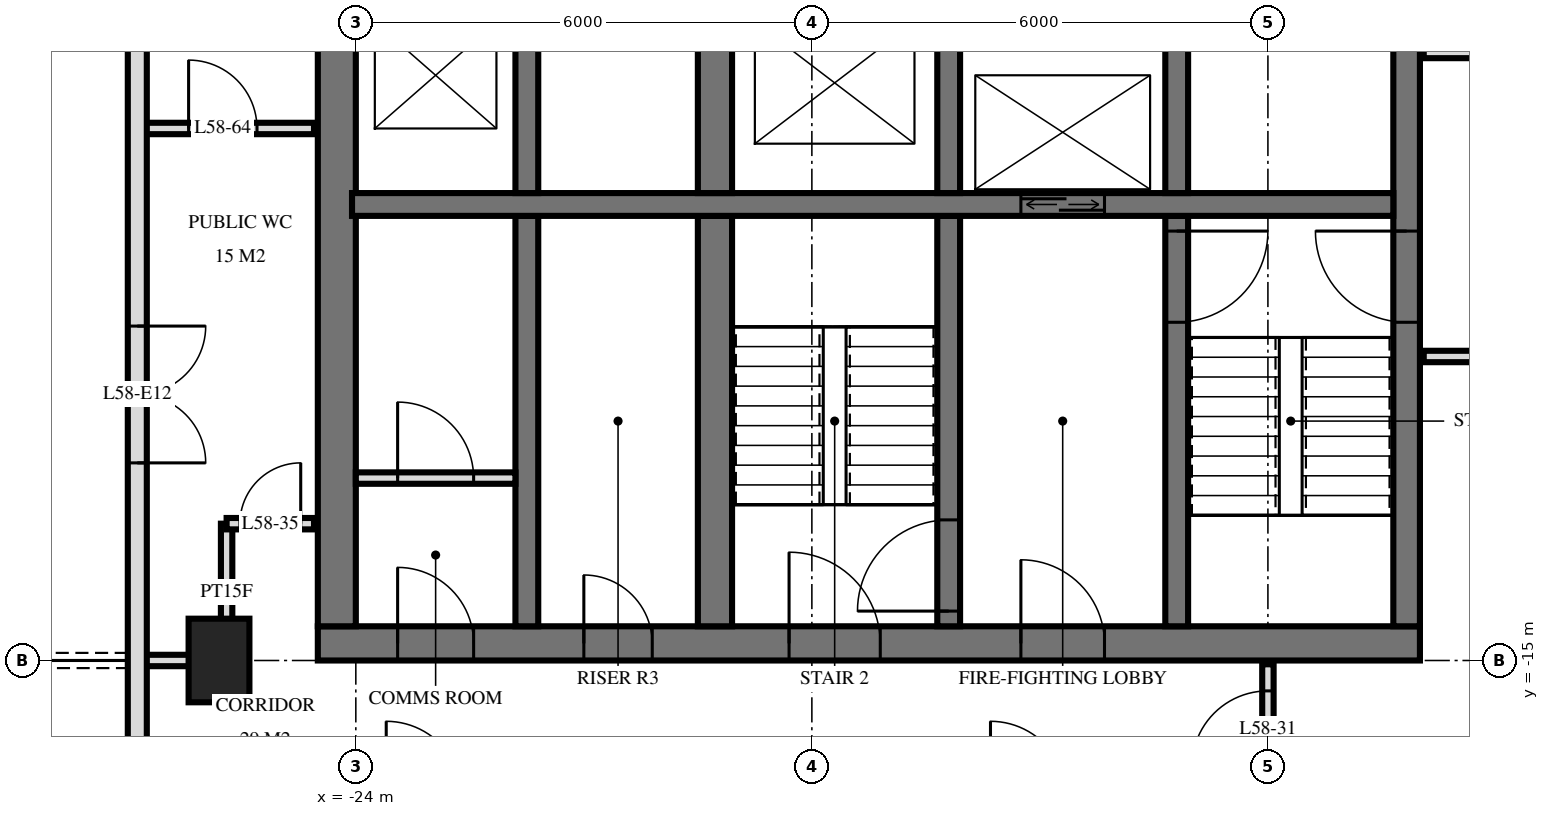
"""IFC4 building model, lengths in metres.
Left out: names, types, materials, properties, quantities, classifications, styles, units other than length and angle.
Written with IfcOpenShell. Run it as: python <this file> out.ifc"""

import sys

from ifc_helpers import new_model, si_unit, direction, frame, frame_2d, origin, origin_2d, place, context, subcontext, project, spatial, rectangle, extrude, element, fill, save


model = new_model("IFC4")
c1 = context("Model", 3, precision=1e-05, world=origin(), true_north=direction((0.0, 1.0)))
c2 = subcontext(c1, "Body", "Model", "MODEL_VIEW")
j1 = project(units=[si_unit("LENGTHUNIT", "METRE"), si_unit("PLANEANGLEUNIT", "RADIAN")], contexts=[c1])
p1 = place(None, origin())
s1 = spatial("IfcSite", under=j1, at=p1, CompositionType="ELEMENT")
p2 = place(p1, origin())
s2 = spatial("IfcBuilding", under=s1, at=p2, CompositionType="ELEMENT")
p3 = place(p2, frame((0.0, 0.0, 222.1)))
s3 = spatial("IfcBuildingStorey", under=s2, at=p3, CompositionType="ELEMENT", Elevation=222.1)
p4 = place(p3, frame((-25.8, -15.0, 0.0), z_axis=(0.0, 0.0, 1.0), x_axis=(0.0, 1.0, 0.0)))
e1 = element("IfcColumn", 1, at=p4, inside=s3, PredefinedType="COLUMN", context=c2, shape_type="SweptSolid", body=[
    extrude(rectangle(XDim=1.1, YDim=0.8, at=origin_2d()), origin(), (0.0, 0.0, 1.0), 3.5),
])
p5 = place(p3, frame((-24.5, -14.775, 0.0), z_axis=(0.0, 0.0, 1.0), x_axis=(1.0, 0.0, 0.0)))
e2 = element("IfcWall", 2, at=p5, inside=s3, PredefinedType="SHEAR", context=c2, shape_type="SweptSolid", body=[
    extrude(rectangle(XDim=14.5, YDim=0.45, at=frame_2d((7.25, 0.0))), origin(), (0.0, 0.0, 1.0), 3.5),
])
p6 = place(p5, frame((6.2, 0.0, 0.0)))
e3 = element("IfcOpeningElement", 3, at=p6, cuts=e2, PredefinedType="OPENING", context=c2, shape_type="SweptSolid", body=[
    extrude(rectangle(XDim=1.2, YDim=2.1, at=frame_2d((0.6, 1.05))), frame((0.0, 0.235, 0.0), z_axis=(0.0, -1.0, 0.0), x_axis=(1.0, 0.0, 0.0)), (0.0, 0.0, 1.0), 0.47),
])
p7 = place(p5, frame((9.25, 0.0, 0.0)))
e4 = element("IfcOpeningElement", 4, at=p7, cuts=e2, PredefinedType="OPENING", context=c2, shape_type="SweptSolid", body=[
    extrude(rectangle(XDim=1.1, YDim=2.1, at=frame_2d((0.55, 1.05))), frame((0.0, 0.235, 0.0), z_axis=(0.0, -1.0, 0.0), x_axis=(1.0, 0.0, 0.0)), (0.0, 0.0, 1.0), 0.47),
])
p8 = place(p5, frame((3.5, 0.0, 0.0)))
e5 = element("IfcOpeningElement", 5, at=p8, cuts=e2, PredefinedType="OPENING", context=c2, shape_type="SweptSolid", body=[
    extrude(rectangle(XDim=0.9, YDim=2.1, at=frame_2d((0.45, 1.05))), frame((0.0, 0.235, 0.0), z_axis=(0.0, -1.0, 0.0), x_axis=(1.0, 0.0, 0.0)), (0.0, 0.0, 1.0), 0.47),
])
p9 = place(p5, frame((1.05, 0.0, 0.0)))
e6 = element("IfcOpeningElement", 6, at=p9, cuts=e2, PredefinedType="OPENING", context=c2, shape_type="SweptSolid", body=[
    extrude(rectangle(XDim=1.0, YDim=2.1, at=frame_2d((0.5, 1.05))), frame((0.0, 0.235, 0.0), z_axis=(0.0, -1.0, 0.0), x_axis=(1.0, 0.0, 0.0)), (0.0, 0.0, 1.0), 0.47),
])
p10 = place(p3, frame((-10.175, -14.55, 0.0), z_axis=(0.0, 0.0, 1.0), x_axis=(0.0, 1.0, 0.0)))
e7 = element("IfcWall", 7, at=p10, inside=s3, PredefinedType="SHEAR", context=c2, shape_type="SweptSolid", body=[
    extrude(rectangle(XDim=14.1, YDim=0.35, at=frame_2d((7.05, 0.0))), origin(), (0.0, 0.0, 1.0), 3.5),
])
p11 = place(p10, frame((8.4, 0.0, 0.0)))
e8 = element("IfcOpeningElement", 8, at=p11, cuts=e7, PredefinedType="OPENING", context=c2, shape_type="SweptSolid", body=[
    extrude(rectangle(XDim=1.4, YDim=2.4, at=frame_2d((0.7, 1.2))), frame((0.0, 0.185, 0.0), z_axis=(0.0, -1.0, 0.0), x_axis=(1.0, 0.0, 0.0)), (0.0, 0.0, 1.0), 0.37),
])
p12 = place(p10, frame((10.0, 0.0, 0.0)))
e9 = element("IfcOpeningElement", 9, at=p12, cuts=e7, PredefinedType="OPENING", context=c2, shape_type="SweptSolid", body=[
    extrude(rectangle(XDim=1.4, YDim=2.4, at=frame_2d((0.7, 1.2))), frame((0.0, 0.185, 0.0), z_axis=(0.0, -1.0, 0.0), x_axis=(1.0, 0.0, 0.0)), (0.0, 0.0, 1.0), 0.37),
])
p13 = place(p10, frame((4.0, 0.0, 0.0)))
e10 = element("IfcOpeningElement", 10, at=p13, cuts=e7, PredefinedType="OPENING", context=c2, shape_type="SweptSolid", body=[
    extrude(rectangle(XDim=1.2, YDim=2.1, at=frame_2d((0.6, 1.05))), frame((0.0, 0.185, 0.0), z_axis=(0.0, -1.0, 0.0), x_axis=(1.0, 0.0, 0.0)), (0.0, 0.0, 1.0), 0.37),
])
p14 = place(p3, frame((-24.25, -14.55, 0.0), z_axis=(0.0, 0.0, 1.0), x_axis=(0.0, 1.0, 0.0)))
e11 = element("IfcWall", 11, at=p14, inside=s3, PredefinedType="SHEAR", context=c2, shape_type="SweptSolid", body=[
    extrude(rectangle(XDim=14.1, YDim=0.5, at=frame_2d((7.05, 0.0))), origin(), (0.0, 0.0, 1.0), 3.5),
])
p15 = place(p3, frame((-24.05, -9.0, 0.0), z_axis=(0.0, 0.0, 1.0), x_axis=(1.0, 0.0, 0.0)))
e12 = element("IfcWall", 12, at=p15, inside=s3, PredefinedType="SHEAR", context=c2, shape_type="SweptSolid", body=[
    extrude(rectangle(XDim=13.7, YDim=0.3, at=frame_2d((6.85, 0.0))), origin(), (0.0, 0.0, 1.0), 3.5),
])
p16 = place(p15, frame((8.8, 0.0, 0.0)))
e13 = element("IfcOpeningElement", 13, at=p16, cuts=e12, PredefinedType="OPENING", context=c2, shape_type="SweptSolid", body=[
    extrude(rectangle(XDim=1.1, YDim=2.1, at=frame_2d((0.55, 1.05))), frame((0.0, 0.16, 0.0), z_axis=(0.0, -1.0, 0.0), x_axis=(1.0, 0.0, 0.0)), (0.0, 0.0, 1.0), 0.32),
])
p17 = place(p3, frame((-13.2, -8.85, 0.0), z_axis=(0.0, 0.0, 1.0), x_axis=(0.0, 1.0, 0.0)))
e14 = element("IfcWall", 14, at=p17, inside=s3, PredefinedType="SHEAR", context=c2, shape_type="SweptSolid", body=[
    extrude(rectangle(XDim=2.3, YDim=0.3, at=frame_2d((1.15, 0.0))), origin(), (0.0, 0.0, 1.0), 3.5),
])
p18 = place(p3, frame((-13.2, -14.55, 0.0), z_axis=(0.0, 0.0, 1.0), x_axis=(0.0, 1.0, 0.0)))
e15 = element("IfcWall", 15, at=p18, inside=s3, PredefinedType="SHEAR", context=c2, shape_type="SweptSolid", body=[
    extrude(rectangle(XDim=5.4, YDim=0.3, at=frame_2d((2.7, 0.0))), origin(), (0.0, 0.0, 1.0), 3.5),
])
p19 = place(p18, frame((4.0, 0.0, 0.0)))
e16 = element("IfcOpeningElement", 16, at=p19, cuts=e15, PredefinedType="OPENING", context=c2, shape_type="SweptSolid", body=[
    extrude(rectangle(XDim=1.2, YDim=2.1, at=frame_2d((0.6, 1.05))), frame((0.0, 0.16, 0.0), z_axis=(0.0, -1.0, 0.0), x_axis=(1.0, 0.0, 0.0)), (0.0, 0.0, 1.0), 0.32),
])
p20 = place(p3, frame((-16.2, -8.85, 0.0), z_axis=(0.0, 0.0, 1.0), x_axis=(0.0, 1.0, 0.0)))
e17 = element("IfcWall", 17, at=p20, inside=s3, PredefinedType="SHEAR", context=c2, shape_type="SweptSolid", body=[
    extrude(rectangle(XDim=2.3, YDim=0.3, at=frame_2d((1.15, 0.0))), origin(), (0.0, 0.0, 1.0), 3.5),
])
p21 = place(p3, frame((-16.2, -14.55, 0.0), z_axis=(0.0, 0.0, 1.0), x_axis=(0.0, 1.0, 0.0)))
e18 = element("IfcWall", 18, at=p21, inside=s3, PredefinedType="SHEAR", context=c2, shape_type="SweptSolid", body=[
    extrude(rectangle(XDim=5.4, YDim=0.3, at=frame_2d((2.7, 0.0))), origin(), (0.0, 0.0, 1.0), 3.5),
])
p22 = place(p21, frame((0.2, 0.0, 0.0)))
e19 = element("IfcOpeningElement", 19, at=p22, cuts=e18, PredefinedType="OPENING", context=c2, shape_type="SweptSolid", body=[
    extrude(rectangle(XDim=1.2, YDim=2.1, at=frame_2d((0.6, 1.05))), frame((0.0, 0.16, 0.0), z_axis=(0.0, -1.0, 0.0), x_axis=(1.0, 0.0, 0.0)), (0.0, 0.0, 1.0), 0.32),
])
p23 = place(p3, frame((-19.275, -8.85, 0.0), z_axis=(0.0, 0.0, 1.0), x_axis=(0.0, 1.0, 0.0)))
e20 = element("IfcWall", 20, at=p23, inside=s3, PredefinedType="SHEAR", context=c2, shape_type="SweptSolid", body=[
    extrude(rectangle(XDim=2.3, YDim=0.45, at=frame_2d((1.15, 0.0))), origin(), (0.0, 0.0, 1.0), 3.5),
])
p24 = place(p3, frame((-19.275, -14.55, 0.0), z_axis=(0.0, 0.0, 1.0), x_axis=(0.0, 1.0, 0.0)))
e21 = element("IfcWall", 21, at=p24, inside=s3, PredefinedType="SHEAR", context=c2, shape_type="SweptSolid", body=[
    extrude(rectangle(XDim=5.4, YDim=0.45, at=frame_2d((2.7, 0.0))), origin(), (0.0, 0.0, 1.0), 3.5),
])
p25 = place(p3, frame((-21.75, -8.85, 0.0), z_axis=(0.0, 0.0, 1.0), x_axis=(0.0, 1.0, 0.0)))
e22 = element("IfcWall", 22, at=p25, inside=s3, PredefinedType="SHEAR", context=c2, shape_type="SweptSolid", body=[
    extrude(rectangle(XDim=2.3, YDim=0.3, at=frame_2d((1.15, 0.0))), origin(), (0.0, 0.0, 1.0), 3.5),
])
p26 = place(p3, frame((-21.75, -14.55, 0.0), z_axis=(0.0, 0.0, 1.0), x_axis=(0.0, 1.0, 0.0)))
e23 = element("IfcWall", 23, at=p26, inside=s3, PredefinedType="SHEAR", context=c2, shape_type="SweptSolid", body=[
    extrude(rectangle(XDim=5.4, YDim=0.3, at=frame_2d((2.7, 0.0))), origin(), (0.0, 0.0, 1.0), 3.5),
])
p27 = place(p3, frame((-26.875, -3.325, 0.0), z_axis=(0.0, 0.0, 1.0), x_axis=(0.0, -1.0, 0.0)))
e24 = element("IfcWall", 24, at=p27, inside=s3, PredefinedType="SOLIDWALL", context=c2, shape_type="SweptSolid", body=[
    extrude(rectangle(XDim=21.551, YDim=0.25, at=frame_2d((10.775, 0.0))), origin(), (0.0, 0.0, 1.0), 3.22),
])
p28 = place(p27, frame((7.275, 0.0, 0.0)))
e25 = element("IfcOpeningElement", 25, at=p28, cuts=e24, PredefinedType="OPENING", context=c2, shape_type="SweptSolid", body=[
    extrude(rectangle(XDim=1.8, YDim=2.4, at=frame_2d((0.9, 1.2))), frame((0.0, 0.135, 0.0), z_axis=(0.0, -1.0, 0.0), x_axis=(1.0, 0.0, 0.0)), (0.0, 0.0, 1.0), 0.27),
])
p29 = place(p27, frame((15.275, 0.0, 0.0)))
e26 = element("IfcOpeningElement", 26, at=p29, cuts=e24, PredefinedType="OPENING", context=c2, shape_type="SweptSolid", body=[
    extrude(rectangle(XDim=1.8, YDim=2.4, at=frame_2d((0.9, 1.2))), frame((0.0, 0.135, 0.0), z_axis=(0.0, -1.0, 0.0), x_axis=(1.0, 0.0, 0.0)), (0.0, 0.0, 1.0), 0.27),
])
p30 = place(p27, frame((18.875, 0.0, 0.0)))
e27 = element("IfcOpeningElement", 27, at=p30, cuts=e24, PredefinedType="OPENING", context=c2, shape_type="SweptSolid", body=[
    extrude(rectangle(XDim=1.8, YDim=2.4, at=frame_2d((0.9, 1.2))), frame((0.0, 0.135, 0.0), z_axis=(0.0, -1.0, 0.0), x_axis=(1.0, 0.0, 0.0)), (0.0, 0.0, 1.0), 0.27),
])
p31 = place(p3, frame((-24.0, -12.6, 0.0), z_axis=(0.0, 0.0, 1.0), x_axis=(1.0, 0.0, 0.0)))
e28 = element("IfcWall", 28, at=p31, inside=s3, PredefinedType="PARTITIONING", context=c2, shape_type="SweptSolid", body=[
    extrude(rectangle(XDim=2.1, YDim=0.15, at=frame_2d((1.05, 0.0))), origin(), (0.0, 0.0, 1.0), 3.2),
])
p32 = place(p31, frame((0.55, 0.0, 0.0)))
e29 = element("IfcOpeningElement", 29, at=p32, cuts=e28, PredefinedType="OPENING", context=c2, shape_type="SweptSolid", body=[
    extrude(rectangle(XDim=1.0, YDim=2.1, at=frame_2d((0.5, 1.05))), frame((0.0, 0.085, 0.0), z_axis=(0.0, -1.0, 0.0), x_axis=(1.0, 0.0, 0.0)), (0.0, 0.0, 1.0), 0.17),
])
p33 = place(p3, frame((-12.0, -16.8, 0.0), z_axis=(0.0, 0.0, 1.0), x_axis=(0.0, 1.0, 0.0)))
e30 = element("IfcWall", 30, at=p33, inside=s3, PredefinedType="PARTITIONING", context=c2, shape_type="SweptSolid", body=[
    extrude(rectangle(XDim=1.75, YDim=0.15, at=frame_2d((0.875, 0.0))), origin(), (0.0, 0.0, 1.0), 3.22),
])
p34 = place(p33, frame((0.4, 0.0, 0.0)))
e31 = element("IfcOpeningElement", 31, at=p34, cuts=e30, PredefinedType="OPENING", context=c2, shape_type="SweptSolid", body=[
    extrude(rectangle(XDim=1.0, YDim=2.1, at=frame_2d((0.5, 1.05))), frame((0.0, 0.085, 0.0), z_axis=(0.0, -1.0, 0.0), x_axis=(1.0, 0.0, 0.0)), (0.0, 0.0, 1.0), 0.17),
])
p35 = place(p3, frame((-25.7, -15.0, 0.0), z_axis=(0.0, 0.0, 1.0), x_axis=(0.0, 1.0, 0.0)))
e32 = element("IfcWall", 32, at=p35, inside=s3, PredefinedType="PARTITIONING", context=c2, shape_type="SweptSolid", body=[
    extrude(rectangle(XDim=1.8, YDim=0.15, at=frame_2d((0.9, 0.0))), origin(), (0.0, 0.0, 1.0), 3.22),
])
p36 = place(p3, frame((-26.82, -15.0, 0.0), z_axis=(0.0, 0.0, 1.0), x_axis=(1.0, 0.0, 0.0)))
e33 = element("IfcWall", 33, at=p36, inside=s3, PredefinedType="PARTITIONING", context=c2, shape_type="SweptSolid", body=[
    extrude(rectangle(XDim=1.12, YDim=0.15, at=frame_2d((0.56, 0.0))), origin(), (0.0, 0.0, 1.0), 3.22),
])
p37 = place(p3, frame((-25.7, -13.2, 0.0), z_axis=(0.0, 0.0, 1.0), x_axis=(1.0, 0.0, 0.0)))
e34 = element("IfcWall", 34, at=p37, inside=s3, PredefinedType="PARTITIONING", context=c2, shape_type="SweptSolid", body=[
    extrude(rectangle(XDim=1.15, YDim=0.15, at=frame_2d((0.575, 0.0))), origin(), (0.0, 0.0, 1.0), 3.22),
])
p38 = place(p37, frame((0.175, 0.0, 0.0)))
e35 = element("IfcOpeningElement", 35, at=p38, cuts=e34, PredefinedType="OPENING", context=c2, shape_type="SweptSolid", body=[
    extrude(rectangle(XDim=0.8, YDim=2.1, at=frame_2d((0.4, 1.05))), frame((0.0, 0.085, 0.0), z_axis=(0.0, -1.0, 0.0), x_axis=(1.0, 0.0, 0.0)), (0.0, 0.0, 1.0), 0.17),
])
p39 = place(p3, frame((-9.95, -11.0, 0.0), z_axis=(0.0, 0.0, 1.0), x_axis=(1.0, 0.0, 0.0)))
e36 = element("IfcWall", 36, at=p39, inside=s3, PredefinedType="PARTITIONING", context=c2, shape_type="SweptSolid", body=[
    extrude(rectangle(XDim=19.9, YDim=0.15, at=frame_2d((9.95, 0.0))), origin(), (0.0, 0.0, 1.0), 3.22),
])
p40 = place(p39, frame((9.45, 0.0, 0.0)))
e37 = element("IfcOpeningElement", 37, at=p40, cuts=e36, PredefinedType="OPENING", context=c2, shape_type="SweptSolid", body=[
    extrude(rectangle(XDim=1.0, YDim=2.1, at=frame_2d((0.5, 1.05))), frame((0.0, 0.085, 0.0), z_axis=(0.0, -1.0, 0.0), x_axis=(1.0, 0.0, 0.0)), (0.0, 0.0, 1.0), 0.17),
])
p41 = place(p39, frame((3.45, 0.0, 0.0)))
e38 = element("IfcOpeningElement", 38, at=p41, cuts=e36, PredefinedType="OPENING", context=c2, shape_type="SweptSolid", body=[
    extrude(rectangle(XDim=1.0, YDim=2.1, at=frame_2d((0.5, 1.05))), frame((0.0, 0.085, 0.0), z_axis=(0.0, -1.0, 0.0), x_axis=(1.0, 0.0, 0.0)), (0.0, 0.0, 1.0), 0.17),
])
p42 = place(p3, frame((-26.82, -8.0, 0.0), z_axis=(0.0, 0.0, 1.0), x_axis=(1.0, 0.0, 0.0)))
e39 = element("IfcWall", 39, at=p42, inside=s3, PredefinedType="PLUMBINGWALL", context=c2, shape_type="SweptSolid", body=[
    extrude(rectangle(XDim=2.27, YDim=0.15, at=frame_2d((1.135, 0.0))), origin(), (0.0, 0.0, 1.0), 3.22),
])
p43 = place(p42, frame((0.62, 0.0, 0.0)))
e40 = element("IfcOpeningElement", 40, at=p43, cuts=e39, PredefinedType="OPENING", context=c2, shape_type="SweptSolid", body=[
    extrude(rectangle(XDim=0.9, YDim=2.1, at=frame_2d((0.45, 1.05))), frame((0.0, 0.085, 0.0), z_axis=(0.0, -1.0, 0.0), x_axis=(1.0, 0.0, 0.0)), (0.0, 0.0, 1.0), 0.17),
])
p44 = place(p3, frame((-9.95, -7.0, 0.0), z_axis=(0.0, 0.0, 1.0), x_axis=(1.0, 0.0, 0.0)))
e41 = element("IfcWall", 41, at=p44, inside=s3, PredefinedType="PARTITIONING", context=c2, shape_type="SweptSolid", body=[
    extrude(rectangle(XDim=19.9, YDim=0.15, at=frame_2d((9.95, 0.0))), origin(), (0.0, 0.0, 1.0), 3.22),
])
p45 = place(p44, frame((9.45, 0.0, 0.0)))
e42 = element("IfcOpeningElement", 42, at=p45, cuts=e41, PredefinedType="OPENING", context=c2, shape_type="SweptSolid", body=[
    extrude(rectangle(XDim=1.0, YDim=2.1, at=frame_2d((0.5, 1.05))), frame((0.0, 0.085, 0.0), z_axis=(0.0, -1.0, 0.0), x_axis=(1.0, 0.0, 0.0)), (0.0, 0.0, 1.0), 0.17),
])
p46 = place(p44, frame((15.45, 0.0, 0.0)))
e43 = element("IfcOpeningElement", 43, at=p46, cuts=e41, PredefinedType="OPENING", context=c2, shape_type="SweptSolid", body=[
    extrude(rectangle(XDim=1.0, YDim=2.1, at=frame_2d((0.5, 1.05))), frame((0.0, 0.085, 0.0), z_axis=(0.0, -1.0, 0.0), x_axis=(1.0, 0.0, 0.0)), (0.0, 0.0, 1.0), 0.17),
])
p47 = place(p28, origin())
e44 = element("IfcDoor", 44, at=p47, inside=s3, OperationType="DOUBLE_DOOR_SINGLE_SWING", PredefinedType="DOOR", context=c2, shape_type="SweptSolid", body=[
    extrude(rectangle(XDim=1.8, YDim=2.4, at=frame_2d((0.9, 1.2))), frame((0.0, 0.025, 0.0), z_axis=(0.0, -1.0, 0.0), x_axis=(1.0, 0.0, 0.0)), (0.0, 0.0, 1.0), 0.05),
])
fill(e25, e44)
p48 = place(p16, origin())
e45 = element("IfcDoor", 45, at=p48, inside=s3, OperationType="DOUBLE_DOOR_SLIDING", PredefinedType="USERDEFINED", context=c2, shape_type="SweptSolid", body=[
    extrude(rectangle(XDim=1.1, YDim=2.1, at=frame_2d((0.55, 1.05))), frame((0.0, 0.025, 0.0), z_axis=(0.0, -1.0, 0.0), x_axis=(1.0, 0.0, 0.0)), (0.0, 0.0, 1.0), 0.05),
])
fill(e13, e45)
p49 = place(p13, origin())
e46 = element("IfcDoor", 46, at=p49, inside=s3, OperationType="SINGLE_SWING_LEFT", PredefinedType="DOOR", context=c2, shape_type="SweptSolid", body=[
    extrude(rectangle(XDim=1.2, YDim=2.1, at=frame_2d((0.6, 1.05))), frame((0.0, 0.025, 0.0), z_axis=(0.0, -1.0, 0.0), x_axis=(1.0, 0.0, 0.0)), (0.0, 0.0, 1.0), 0.05),
])
fill(e10, e46)
p50 = place(p6, origin())
e47 = element("IfcDoor", 47, at=p50, inside=s3, OperationType="SINGLE_SWING_RIGHT", PredefinedType="DOOR", context=c2, shape_type="SweptSolid", body=[
    extrude(rectangle(XDim=1.2, YDim=2.1, at=frame_2d((0.6, 1.05))), frame((0.0, 0.025, 0.0), z_axis=(0.0, -1.0, 0.0), x_axis=(1.0, 0.0, 0.0)), (0.0, 0.0, 1.0), 0.05),
])
fill(e3, e47)
p51 = place(p7, origin())
e48 = element("IfcDoor", 48, at=p51, inside=s3, OperationType="SINGLE_SWING_RIGHT", PredefinedType="DOOR", context=c2, shape_type="SweptSolid", body=[
    extrude(rectangle(XDim=1.1, YDim=2.1, at=frame_2d((0.55, 1.05))), frame((0.0, 0.025, 0.0), z_axis=(0.0, -1.0, 0.0), x_axis=(1.0, 0.0, 0.0)), (0.0, 0.0, 1.0), 0.05),
])
fill(e4, e48)
p52 = place(p8, origin())
e49 = element("IfcDoor", 49, at=p52, inside=s3, OperationType="SINGLE_SWING_RIGHT", PredefinedType="DOOR", context=c2, shape_type="SweptSolid", body=[
    extrude(rectangle(XDim=0.9, YDim=2.1, at=frame_2d((0.45, 1.05))), frame((0.0, 0.025, 0.0), z_axis=(0.0, -1.0, 0.0), x_axis=(1.0, 0.0, 0.0)), (0.0, 0.0, 1.0), 0.05),
])
fill(e5, e49)
p53 = place(p9, origin())
e50 = element("IfcDoor", 50, at=p53, inside=s3, OperationType="SINGLE_SWING_RIGHT", PredefinedType="DOOR", context=c2, shape_type="SweptSolid", body=[
    extrude(rectangle(XDim=1.0, YDim=2.1, at=frame_2d((0.5, 1.05))), frame((0.0, 0.025, 0.0), z_axis=(0.0, -1.0, 0.0), x_axis=(1.0, 0.0, 0.0)), (0.0, 0.0, 1.0), 0.05),
])
fill(e6, e50)
p54 = place(p19, frame((0.6, 0.0, 0.0), z_axis=(0.0, 0.0, 1.0), x_axis=(-1.0, 0.0, 0.0)))
e51 = element("IfcDoor", 51, at=p54, inside=s3, OperationType="SINGLE_SWING_RIGHT", PredefinedType="DOOR", context=c2, shape_type="SweptSolid", body=[
    extrude(rectangle(XDim=1.2, YDim=2.1, at=frame_2d((0.0, 1.05))), frame((0.0, -0.025, 0.0), z_axis=(0.0, 1.0, 0.0), x_axis=(-1.0, 0.0, 0.0)), (0.0, 0.0, 1.0), 0.05),
])
fill(e16, e51)
p55 = place(p22, origin())
e52 = element("IfcDoor", 52, at=p55, inside=s3, OperationType="SINGLE_SWING_RIGHT", PredefinedType="DOOR", context=c2, shape_type="SweptSolid", body=[
    extrude(rectangle(XDim=1.2, YDim=2.1, at=frame_2d((0.6, 1.05))), frame((0.0, 0.025, 0.0), z_axis=(0.0, -1.0, 0.0), x_axis=(1.0, 0.0, 0.0)), (0.0, 0.0, 1.0), 0.05),
])
fill(e19, e52)
p56 = place(p32, origin())
e53 = element("IfcDoor", 53, at=p56, inside=s3, OperationType="SINGLE_SWING_RIGHT", PredefinedType="DOOR", context=c2, shape_type="SweptSolid", body=[
    extrude(rectangle(XDim=1.0, YDim=2.1, at=frame_2d((0.5, 1.05))), frame((0.0, 0.025, 0.0), z_axis=(0.0, -1.0, 0.0), x_axis=(1.0, 0.0, 0.0)), (0.0, 0.0, 1.0), 0.05),
])
fill(e29, e53)
p57 = place(p34, origin())
e54 = element("IfcDoor", 54, at=p57, inside=s3, OperationType="SINGLE_SWING_RIGHT", PredefinedType="DOOR", context=c2, shape_type="SweptSolid", body=[
    extrude(rectangle(XDim=1.0, YDim=2.1, at=frame_2d((0.5, 1.05))), frame((0.0, 0.025, 0.0), z_axis=(0.0, -1.0, 0.0), x_axis=(1.0, 0.0, 0.0)), (0.0, 0.0, 1.0), 0.05),
])
fill(e31, e54)
p58 = place(p38, origin())
e55 = element("IfcDoor", 55, at=p58, inside=s3, OperationType="SINGLE_SWING_LEFT", PredefinedType="DOOR", context=c2, shape_type="SweptSolid", body=[
    extrude(rectangle(XDim=0.8, YDim=2.1, at=frame_2d((0.4, 1.05))), frame((0.0, 0.025, 0.0), z_axis=(0.0, -1.0, 0.0), x_axis=(1.0, 0.0, 0.0)), (0.0, 0.0, 1.0), 0.05),
])
fill(e35, e55)
p59 = place(p43, origin())
e56 = element("IfcDoor", 56, at=p59, inside=s3, OperationType="SINGLE_SWING_RIGHT", PredefinedType="DOOR", context=c2, shape_type="SweptSolid", body=[
    extrude(rectangle(XDim=0.9, YDim=2.1, at=frame_2d((0.45, 1.05))), frame((0.0, 0.025, 0.0), z_axis=(0.0, -1.0, 0.0), x_axis=(1.0, 0.0, 0.0)), (0.0, 0.0, 1.0), 0.05),
])
fill(e40, e56)
save(model, sys.argv[1])
